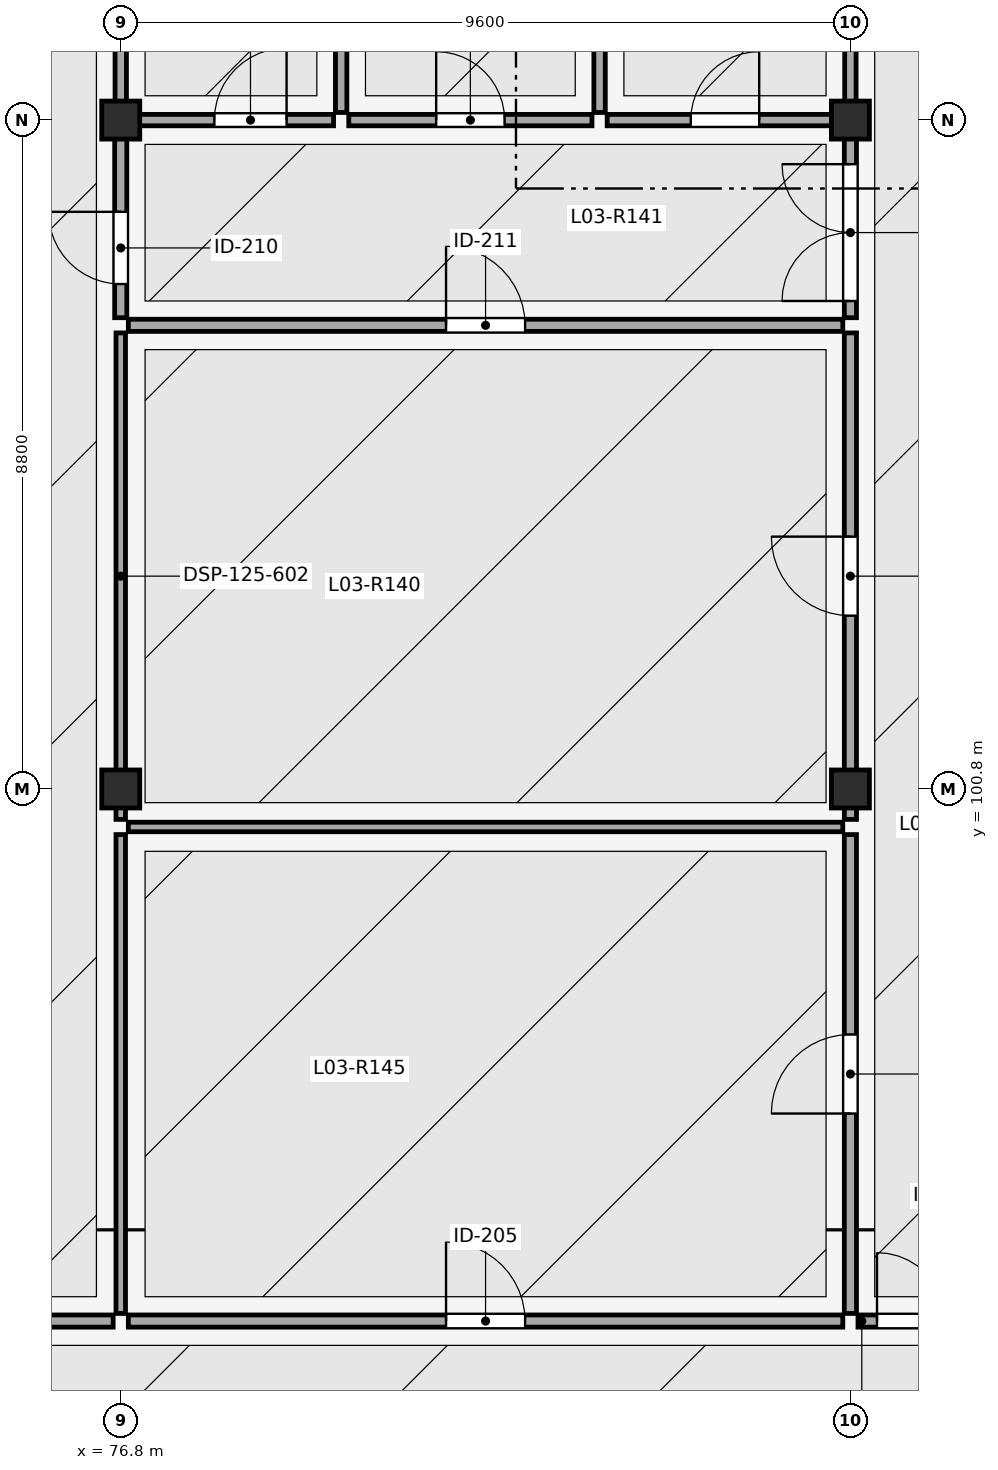
"""IFC4 building model, lengths in metres.
Left out: names, types, materials, properties, quantities, classifications, styles, units other than length and angle.
Written with IfcOpenShell. Run it as: python <this file> out.ifc"""

import sys

from ifc_helpers import new_model, si_unit, direction, frame, frame_2d, origin, origin_2d, place, context, subcontext, project, spatial, rectangle, extrude, element, fill, save


model = new_model("IFC4")
c1 = context("Model", 3, precision=1e-05, world=origin(), true_north=direction((0.0, 1.0)))
c2 = subcontext(c1, "Body", "Model", "MODEL_VIEW")
j1 = project(units=[si_unit("LENGTHUNIT", "METRE"), si_unit("PLANEANGLEUNIT", "RADIAN")], contexts=[c1])
p1 = place(None, origin())
s1 = spatial("IfcSite", under=j1, at=p1, CompositionType="ELEMENT")
p2 = place(p1, origin())
s2 = spatial("IfcBuilding", under=s1, at=p2, CompositionType="ELEMENT")
p3 = place(p2, frame((0.0, 0.0, 14.1)))
s3 = spatial("IfcBuildingStorey", under=s2, at=p3, CompositionType="ELEMENT", Elevation=14.1)
for number, where, z_axis, x_axis in (
    (1, (76.8, 100.8, 0.0), (0.0, 0.0, 1.0), (1.0, 0.0, 0.0)),
    (2, (76.8, 109.6, 0.0), (0.0, 0.0, 1.0), (1.0, 0.0, 0.0)),
    (3, (86.4, 100.8, 0.0), (0.0, 0.0, 1.0), (1.0, 0.0, 0.0)),
):
    element("IfcColumn", number, at=place(p3, frame(where, z_axis=z_axis, x_axis=x_axis)), inside=s3, PredefinedType="COLUMN", context=c2, shape_type="SweptSolid", body=[
        extrude(rectangle(XDim=0.5, YDim=0.5, at=origin_2d()), origin(), (0.0, 0.0, 1.0), 4.5),
    ])
p4 = place(p3, frame((86.4, 109.6, 0.0), z_axis=(0.0, 0.0, 1.0), x_axis=(1.0, 0.0, 0.0)))
e4 = element("IfcColumn", 4, at=p4, inside=s3, PredefinedType="COLUMN", context=c2, shape_type="SweptSolid", body=[
    extrude(rectangle(XDim=0.5, YDim=0.5, at=origin_2d()), origin(), (0.0, 0.0, 1.0), 4.326),
])
p5 = place(p3, frame((86.5, 93.8, 0.0), z_axis=(0.0, 0.0, 1.0), x_axis=(1.0, 0.0, 0.0)))
e5 = element("IfcWall", 5, at=p5, inside=s3, PredefinedType="PARTITIONING", context=c2, shape_type="SweptSolid", body=[
    extrude(rectangle(XDim=2.3, YDim=0.16, at=frame_2d((1.15, 0.0))), origin(), (0.0, 0.0, 1.0), 3.1),
])
p6 = place(p5, frame((0.25, 0.0, 0.0)))
e6 = element("IfcOpeningElement", 6, at=p6, cuts=e5, PredefinedType="OPENING", context=c2, shape_type="SweptSolid", body=[
    extrude(rectangle(XDim=1.8, YDim=2.15, at=frame_2d((0.9, 1.075))), frame((0.0, 0.09, 0.0), z_axis=(0.0, -1.0, 0.0), x_axis=(1.0, 0.0, 0.0)), (0.0, 0.0, 1.0), 0.18),
])
p7 = place(p3, frame((48.05, 93.8, 0.0), z_axis=(0.0, 0.0, 1.0), x_axis=(1.0, 0.0, 0.0)))
e7 = element("IfcWall", 7, at=p7, inside=s3, PredefinedType="PARTITIONING", context=c2, shape_type="SweptSolid", body=[
    extrude(rectangle(XDim=28.65, YDim=0.16, at=frame_2d((14.325, 0.0))), origin(), (0.0, 0.0, 1.0), 3.1),
])
p8 = place(p7, frame((13.85, 0.0, 0.0)))
e8 = element("IfcOpeningElement", 8, at=p8, cuts=e7, PredefinedType="OPENING", context=c2, shape_type="SweptSolid", body=[
    extrude(rectangle(XDim=0.95, YDim=2.15, at=frame_2d((0.475, 1.075))), frame((0.0, 0.09, 0.0), z_axis=(0.0, -1.0, 0.0), x_axis=(1.0, 0.0, 0.0)), (0.0, 0.0, 1.0), 0.18),
])
p9 = place(p3, frame((76.9, 93.8, 0.0), z_axis=(0.0, 0.0, 1.0), x_axis=(1.0, 0.0, 0.0)))
e9 = element("IfcWall", 9, at=p9, inside=s3, PredefinedType="PARTITIONING", context=c2, shape_type="SweptSolid", body=[
    extrude(rectangle(XDim=9.4, YDim=0.16, at=frame_2d((4.7, 0.0))), origin(), (0.0, 0.0, 1.0), 3.1),
])
p10 = place(p9, frame((4.18, 0.0, 0.0)))
e10 = element("IfcOpeningElement", 10, at=p10, cuts=e9, PredefinedType="OPENING", context=c2, shape_type="SweptSolid", body=[
    extrude(rectangle(XDim=1.04, YDim=2.18, at=frame_2d((0.52, 1.09))), frame((0.0, 0.09, 0.0), z_axis=(0.0, -1.0, 0.0), x_axis=(1.0, 0.0, 0.0)), (0.0, 0.0, 1.0), 0.18),
])
p11 = place(p3, frame((86.4, 100.4, 0.0), z_axis=(0.0, 0.0, 1.0), x_axis=(0.0, 1.0, 0.0)))
e11 = element("IfcWall", 11, at=p11, inside=s3, PredefinedType="PARTITIONING", context=c2, shape_type="SweptSolid", body=[
    extrude(rectangle(XDim=6.4, YDim=0.16, at=frame_2d((3.2, 0.0))), origin(), (0.0, 0.0, 1.0), 3.1),
])
p12 = place(p11, frame((2.68, 0.0, 0.0)))
e12 = element("IfcOpeningElement", 12, at=p12, cuts=e11, PredefinedType="OPENING", context=c2, shape_type="SweptSolid", body=[
    extrude(rectangle(XDim=1.04, YDim=2.18, at=frame_2d((0.52, 1.09))), frame((0.0, 0.09, 0.0), z_axis=(0.0, -1.0, 0.0), x_axis=(1.0, 0.0, 0.0)), (0.0, 0.0, 1.0), 0.18),
])
p13 = place(p3, frame((86.4, 107.0, 0.0), z_axis=(0.0, 0.0, 1.0), x_axis=(0.0, 1.0, 0.0)))
e13 = element("IfcWall", 13, at=p13, inside=s3, PredefinedType="PARTITIONING", context=c2, shape_type="SweptSolid", body=[
    extrude(rectangle(XDim=2.5, YDim=0.16, at=frame_2d((1.25, 0.0))), origin(), (0.0, 0.0, 1.0), 3.1),
])
p14 = place(p13, frame((0.22, 0.0, 0.0)))
e14 = element("IfcOpeningElement", 14, at=p14, cuts=e13, PredefinedType="OPENING", context=c2, shape_type="SweptSolid", body=[
    extrude(rectangle(XDim=1.8, YDim=2.15, at=frame_2d((0.9, 1.075))), frame((0.0, 0.09, 0.0), z_axis=(0.0, -1.0, 0.0), x_axis=(1.0, 0.0, 0.0)), (0.0, 0.0, 1.0), 0.18),
])
p15 = place(p3, frame((86.4, 109.7, 0.0), z_axis=(0.0, 0.0, 1.0), x_axis=(0.0, 1.0, 0.0)))
e15 = element("IfcWall", 15, at=p15, inside=s3, PredefinedType="PARTITIONING", context=c2, shape_type="SweptSolid", body=[
    extrude(rectangle(XDim=8.25, YDim=0.15, at=frame_2d((4.125, 0.0))), origin(), (0.0, 0.0, 1.0), 2.816),
])
p16 = place(p15, frame((3.675, 0.0, 0.0)))
e16 = element("IfcOpeningElement", 16, at=p16, cuts=e15, PredefinedType="OPENING", context=c2, shape_type="SweptSolid", body=[
    extrude(rectangle(XDim=0.9, YDim=2.15, at=frame_2d((0.45, 1.075))), frame((0.0, 0.085, 0.0), z_axis=(0.0, -1.0, 0.0), x_axis=(1.0, 0.0, 0.0)), (0.0, 0.0, 1.0), 0.17),
])
p17 = place(p3, frame((86.4, 93.9, 0.0), z_axis=(0.0, 0.0, 1.0), x_axis=(0.0, 1.0, 0.0)))
e17 = element("IfcWall", 17, at=p17, inside=s3, PredefinedType="PARTITIONING", context=c2, shape_type="SweptSolid", body=[
    extrude(rectangle(XDim=6.3, YDim=0.16, at=frame_2d((3.15, 0.0))), origin(), (0.0, 0.0, 1.0), 3.1),
])
p18 = place(p17, frame((2.63, 0.0, 0.0)))
e18 = element("IfcOpeningElement", 18, at=p18, cuts=e17, PredefinedType="OPENING", context=c2, shape_type="SweptSolid", body=[
    extrude(rectangle(XDim=1.04, YDim=2.18, at=frame_2d((0.52, 1.09))), frame((0.0, 0.09, 0.0), z_axis=(0.0, -1.0, 0.0), x_axis=(1.0, 0.0, 0.0)), (0.0, 0.0, 1.0), 0.18),
])
p19 = place(p3, frame((76.8, 100.4, 0.0), z_axis=(0.0, 0.0, 1.0), x_axis=(0.0, 1.0, 0.0)))
e19 = element("IfcWall", 19, at=p19, inside=s3, PredefinedType="PARTITIONING", context=c2, shape_type="SweptSolid", body=[
    extrude(rectangle(XDim=6.4, YDim=0.125, at=frame_2d((3.2, 0.0))), origin(), (0.0, 0.0, 1.0), 3.1),
])
p20 = place(p3, frame((76.8, 107.0, 0.0), z_axis=(0.0, 0.0, 1.0), x_axis=(0.0, 1.0, 0.0)))
e20 = element("IfcWall", 20, at=p20, inside=s3, PredefinedType="PARTITIONING", context=c2, shape_type="SweptSolid", body=[
    extrude(rectangle(XDim=2.5, YDim=0.16, at=frame_2d((1.25, 0.0))), origin(), (0.0, 0.0, 1.0), 3.1),
])
p21 = place(p20, frame((0.443, 0.0, 0.0)))
e21 = element("IfcOpeningElement", 21, at=p21, cuts=e20, PredefinedType="OPENING", context=c2, shape_type="SweptSolid", body=[
    extrude(rectangle(XDim=0.95, YDim=2.15, at=frame_2d((0.475, 1.075))), frame((0.0, 0.09, 0.0), z_axis=(0.0, -1.0, 0.0), x_axis=(1.0, 0.0, 0.0)), (0.0, 0.0, 1.0), 0.18),
])
p22 = place(p3, frame((76.8, 109.7, 0.0), z_axis=(0.0, 0.0, 1.0), x_axis=(0.0, 1.0, 0.0)))
e22 = element("IfcWall", 22, at=p22, inside=s3, PredefinedType="PARTITIONING", context=c2, shape_type="SweptSolid", body=[
    extrude(rectangle(XDim=8.25, YDim=0.15, at=frame_2d((4.125, 0.0))), origin(), (0.0, 0.0, 1.0), 2.992),
])
p23 = place(p3, frame((76.8, 93.9, 0.0), z_axis=(0.0, 0.0, 1.0), x_axis=(0.0, 1.0, 0.0)))
e23 = element("IfcWall", 23, at=p23, inside=s3, PredefinedType="PARTITIONING", context=c2, shape_type="SweptSolid", body=[
    extrude(rectangle(XDim=6.3, YDim=0.125, at=frame_2d((3.15, 0.0))), origin(), (0.0, 0.0, 1.0), 3.1),
])
p24 = place(p3, frame((76.9, 106.9, 0.0), z_axis=(0.0, 0.0, 1.0), x_axis=(1.0, 0.0, 0.0)))
e24 = element("IfcWall", 24, at=p24, inside=s3, PredefinedType="PARTITIONING", context=c2, shape_type="SweptSolid", body=[
    extrude(rectangle(XDim=9.4, YDim=0.16, at=frame_2d((4.7, 0.0))), origin(), (0.0, 0.0, 1.0), 3.1),
])
p25 = place(p24, frame((4.18, 0.0, 0.0)))
e25 = element("IfcOpeningElement", 25, at=p25, cuts=e24, PredefinedType="OPENING", context=c2, shape_type="SweptSolid", body=[
    extrude(rectangle(XDim=1.04, YDim=2.18, at=frame_2d((0.52, 1.09))), frame((0.0, 0.09, 0.0), z_axis=(0.0, -1.0, 0.0), x_axis=(1.0, 0.0, 0.0)), (0.0, 0.0, 1.0), 0.18),
])
p26 = place(p3, frame((76.9, 100.3, 0.0), z_axis=(0.0, 0.0, 1.0), x_axis=(1.0, 0.0, 0.0)))
e26 = element("IfcWall", 26, at=p26, inside=s3, PredefinedType="PARTITIONING", context=c2, shape_type="SweptSolid", body=[
    extrude(rectangle(XDim=9.4, YDim=0.125, at=frame_2d((4.7, 0.0))), origin(), (0.0, 0.0, 1.0), 3.1),
])
p27 = place(p3, frame((76.9, 109.6, 0.0), z_axis=(0.0, 0.0, 1.0), x_axis=(1.0, 0.0, 0.0)))
e27 = element("IfcWall", 27, at=p27, inside=s3, PredefinedType="PARTITIONING", context=c2, shape_type="SweptSolid", body=[
    extrude(rectangle(XDim=2.7, YDim=0.15, at=frame_2d((1.35, 0.0))), origin(), (0.0, 0.0, 1.0), 3.1),
])
p28 = place(p27, frame((1.132, 0.0, 0.0)))
e28 = element("IfcOpeningElement", 28, at=p28, cuts=e27, PredefinedType="OPENING", context=c2, shape_type="SweptSolid", body=[
    extrude(rectangle(XDim=0.95, YDim=2.15, at=frame_2d((0.475, 1.075))), frame((0.0, 0.085, 0.0), z_axis=(0.0, -1.0, 0.0), x_axis=(1.0, 0.0, 0.0)), (0.0, 0.0, 1.0), 0.17),
])
p29 = place(p3, frame((79.8, 109.6, 0.0), z_axis=(0.0, 0.0, 1.0), x_axis=(1.0, 0.0, 0.0)))
e29 = element("IfcWall", 29, at=p29, inside=s3, PredefinedType="PARTITIONING", context=c2, shape_type="SweptSolid", body=[
    extrude(rectangle(XDim=3.2, YDim=0.15, at=frame_2d((1.6, 0.0))), origin(), (0.0, 0.0, 1.0), 3.1),
])
p30 = place(p29, frame((1.15, 0.0, 0.0)))
e30 = element("IfcOpeningElement", 30, at=p30, cuts=e29, PredefinedType="OPENING", context=c2, shape_type="SweptSolid", body=[
    extrude(rectangle(XDim=0.9, YDim=2.15, at=frame_2d((0.45, 1.075))), frame((0.0, 0.085, 0.0), z_axis=(0.0, -1.0, 0.0), x_axis=(1.0, 0.0, 0.0)), (0.0, 0.0, 1.0), 0.17),
])
p31 = place(p3, frame((83.2, 109.6, 0.0), z_axis=(0.0, 0.0, 1.0), x_axis=(1.0, 0.0, 0.0)))
e31 = element("IfcWall", 31, at=p31, inside=s3, PredefinedType="PARTITIONING", context=c2, shape_type="SweptSolid", body=[
    extrude(rectangle(XDim=3.1, YDim=0.15, at=frame_2d((1.55, 0.0))), origin(), (0.0, 0.0, 1.0), 3.1),
])
p32 = place(p31, frame((1.1, 0.0, 0.0)))
e32 = element("IfcOpeningElement", 32, at=p32, cuts=e31, PredefinedType="OPENING", context=c2, shape_type="SweptSolid", body=[
    extrude(rectangle(XDim=0.9, YDim=2.15, at=frame_2d((0.45, 1.075))), frame((0.0, 0.085, 0.0), z_axis=(0.0, -1.0, 0.0), x_axis=(1.0, 0.0, 0.0)), (0.0, 0.0, 1.0), 0.17),
])
for number, where, z_axis, x_axis in (
    (33, (79.7, 109.7, 0.0), (0.0, 0.0, 1.0), (0.0, 1.0, 0.0)),
    (34, (83.1, 109.7, 0.0), (0.0, 0.0, 1.0), (0.0, 1.0, 0.0)),
):
    element("IfcWall", number, at=place(p3, frame(where, z_axis=z_axis, x_axis=x_axis)), inside=s3, PredefinedType="PARTITIONING", context=c2, shape_type="SweptSolid", body=[
        extrude(rectangle(XDim=8.25, YDim=0.15, at=frame_2d((4.125, 0.0))), origin(), (0.0, 0.0, 1.0), 3.1),
    ])
p33 = place(p6, origin())
e35 = element("IfcDoor", 35, at=p33, inside=s3, OperationType="DOUBLE_DOOR_SINGLE_SWING", PredefinedType="DOOR", context=c2, shape_type="SweptSolid", body=[
    extrude(rectangle(XDim=1.8, YDim=2.15, at=frame_2d((0.9, 1.075))), frame((0.0, 0.025, 0.0), z_axis=(0.0, -1.0, 0.0), x_axis=(1.0, 0.0, 0.0)), (0.0, 0.0, 1.0), 0.05),
])
fill(e6, e35)
p34 = place(p10, origin())
e36 = element("IfcDoor", 36, at=p34, inside=s3, OperationType="SINGLE_SWING_LEFT", PredefinedType="DOOR", context=c2, shape_type="SweptSolid", body=[
    extrude(rectangle(XDim=1.04, YDim=2.18, at=frame_2d((0.52, 1.09))), frame((0.0, 0.025, 0.0), z_axis=(0.0, -1.0, 0.0), x_axis=(1.0, 0.0, 0.0)), (0.0, 0.0, 1.0), 0.05),
])
fill(e10, e36)
p35 = place(p12, origin())
e37 = element("IfcDoor", 37, at=p35, inside=s3, OperationType="SINGLE_SWING_RIGHT", PredefinedType="DOOR", context=c2, shape_type="SweptSolid", body=[
    extrude(rectangle(XDim=1.04, YDim=2.18, at=frame_2d((0.52, 1.09))), frame((0.0, 0.025, 0.0), z_axis=(0.0, -1.0, 0.0), x_axis=(1.0, 0.0, 0.0)), (0.0, 0.0, 1.0), 0.05),
])
fill(e12, e37)
p36 = place(p14, origin())
e38 = element("IfcDoor", 38, at=p36, inside=s3, OperationType="DOUBLE_DOOR_SINGLE_SWING", PredefinedType="DOOR", context=c2, shape_type="SweptSolid", body=[
    extrude(rectangle(XDim=1.8, YDim=2.15, at=frame_2d((0.9, 1.075))), frame((0.0, 0.025, 0.0), z_axis=(0.0, -1.0, 0.0), x_axis=(1.0, 0.0, 0.0)), (0.0, 0.0, 1.0), 0.05),
])
fill(e14, e38)
p37 = place(p18, origin())
e39 = element("IfcDoor", 39, at=p37, inside=s3, OperationType="SINGLE_SWING_LEFT", PredefinedType="DOOR", context=c2, shape_type="SweptSolid", body=[
    extrude(rectangle(XDim=1.04, YDim=2.18, at=frame_2d((0.52, 1.09))), frame((0.0, 0.025, 0.0), z_axis=(0.0, -1.0, 0.0), x_axis=(1.0, 0.0, 0.0)), (0.0, 0.0, 1.0), 0.05),
])
fill(e18, e39)
p38 = place(p21, origin())
e40 = element("IfcDoor", 40, at=p38, inside=s3, OperationType="SINGLE_SWING_RIGHT", PredefinedType="DOOR", context=c2, shape_type="SweptSolid", body=[
    extrude(rectangle(XDim=0.95, YDim=2.15, at=frame_2d((0.475, 1.075))), frame((0.0, 0.025, 0.0), z_axis=(0.0, -1.0, 0.0), x_axis=(1.0, 0.0, 0.0)), (0.0, 0.0, 1.0), 0.05),
])
fill(e21, e40)
p39 = place(p25, origin())
e41 = element("IfcDoor", 41, at=p39, inside=s3, OperationType="SINGLE_SWING_LEFT", PredefinedType="DOOR", context=c2, shape_type="SweptSolid", body=[
    extrude(rectangle(XDim=1.04, YDim=2.18, at=frame_2d((0.52, 1.09))), frame((0.0, 0.025, 0.0), z_axis=(0.0, -1.0, 0.0), x_axis=(1.0, 0.0, 0.0)), (0.0, 0.0, 1.0), 0.05),
])
fill(e25, e41)
p40 = place(p28, origin())
e42 = element("IfcDoor", 42, at=p40, inside=s3, OperationType="SINGLE_SWING_RIGHT", PredefinedType="DOOR", context=c2, shape_type="SweptSolid", body=[
    extrude(rectangle(XDim=0.95, YDim=2.15, at=frame_2d((0.475, 1.075))), frame((0.0, 0.025, 0.0), z_axis=(0.0, -1.0, 0.0), x_axis=(1.0, 0.0, 0.0)), (0.0, 0.0, 1.0), 0.05),
])
fill(e28, e42)
p41 = place(p30, origin())
e43 = element("IfcDoor", 43, at=p41, inside=s3, OperationType="SINGLE_SWING_LEFT", PredefinedType="DOOR", context=c2, shape_type="SweptSolid", body=[
    extrude(rectangle(XDim=0.9, YDim=2.15, at=frame_2d((0.45, 1.075))), frame((0.0, 0.025, 0.0), z_axis=(0.0, -1.0, 0.0), x_axis=(1.0, 0.0, 0.0)), (0.0, 0.0, 1.0), 0.05),
])
fill(e30, e43)
p42 = place(p32, origin())
e44 = element("IfcDoor", 44, at=p42, inside=s3, OperationType="SINGLE_SWING_RIGHT", PredefinedType="DOOR", context=c2, shape_type="SweptSolid", body=[
    extrude(rectangle(XDim=0.9, YDim=2.15, at=frame_2d((0.45, 1.075))), frame((0.0, 0.025, 0.0), z_axis=(0.0, -1.0, 0.0), x_axis=(1.0, 0.0, 0.0)), (0.0, 0.0, 1.0), 0.05),
])
fill(e32, e44)
save(model, sys.argv[1])
